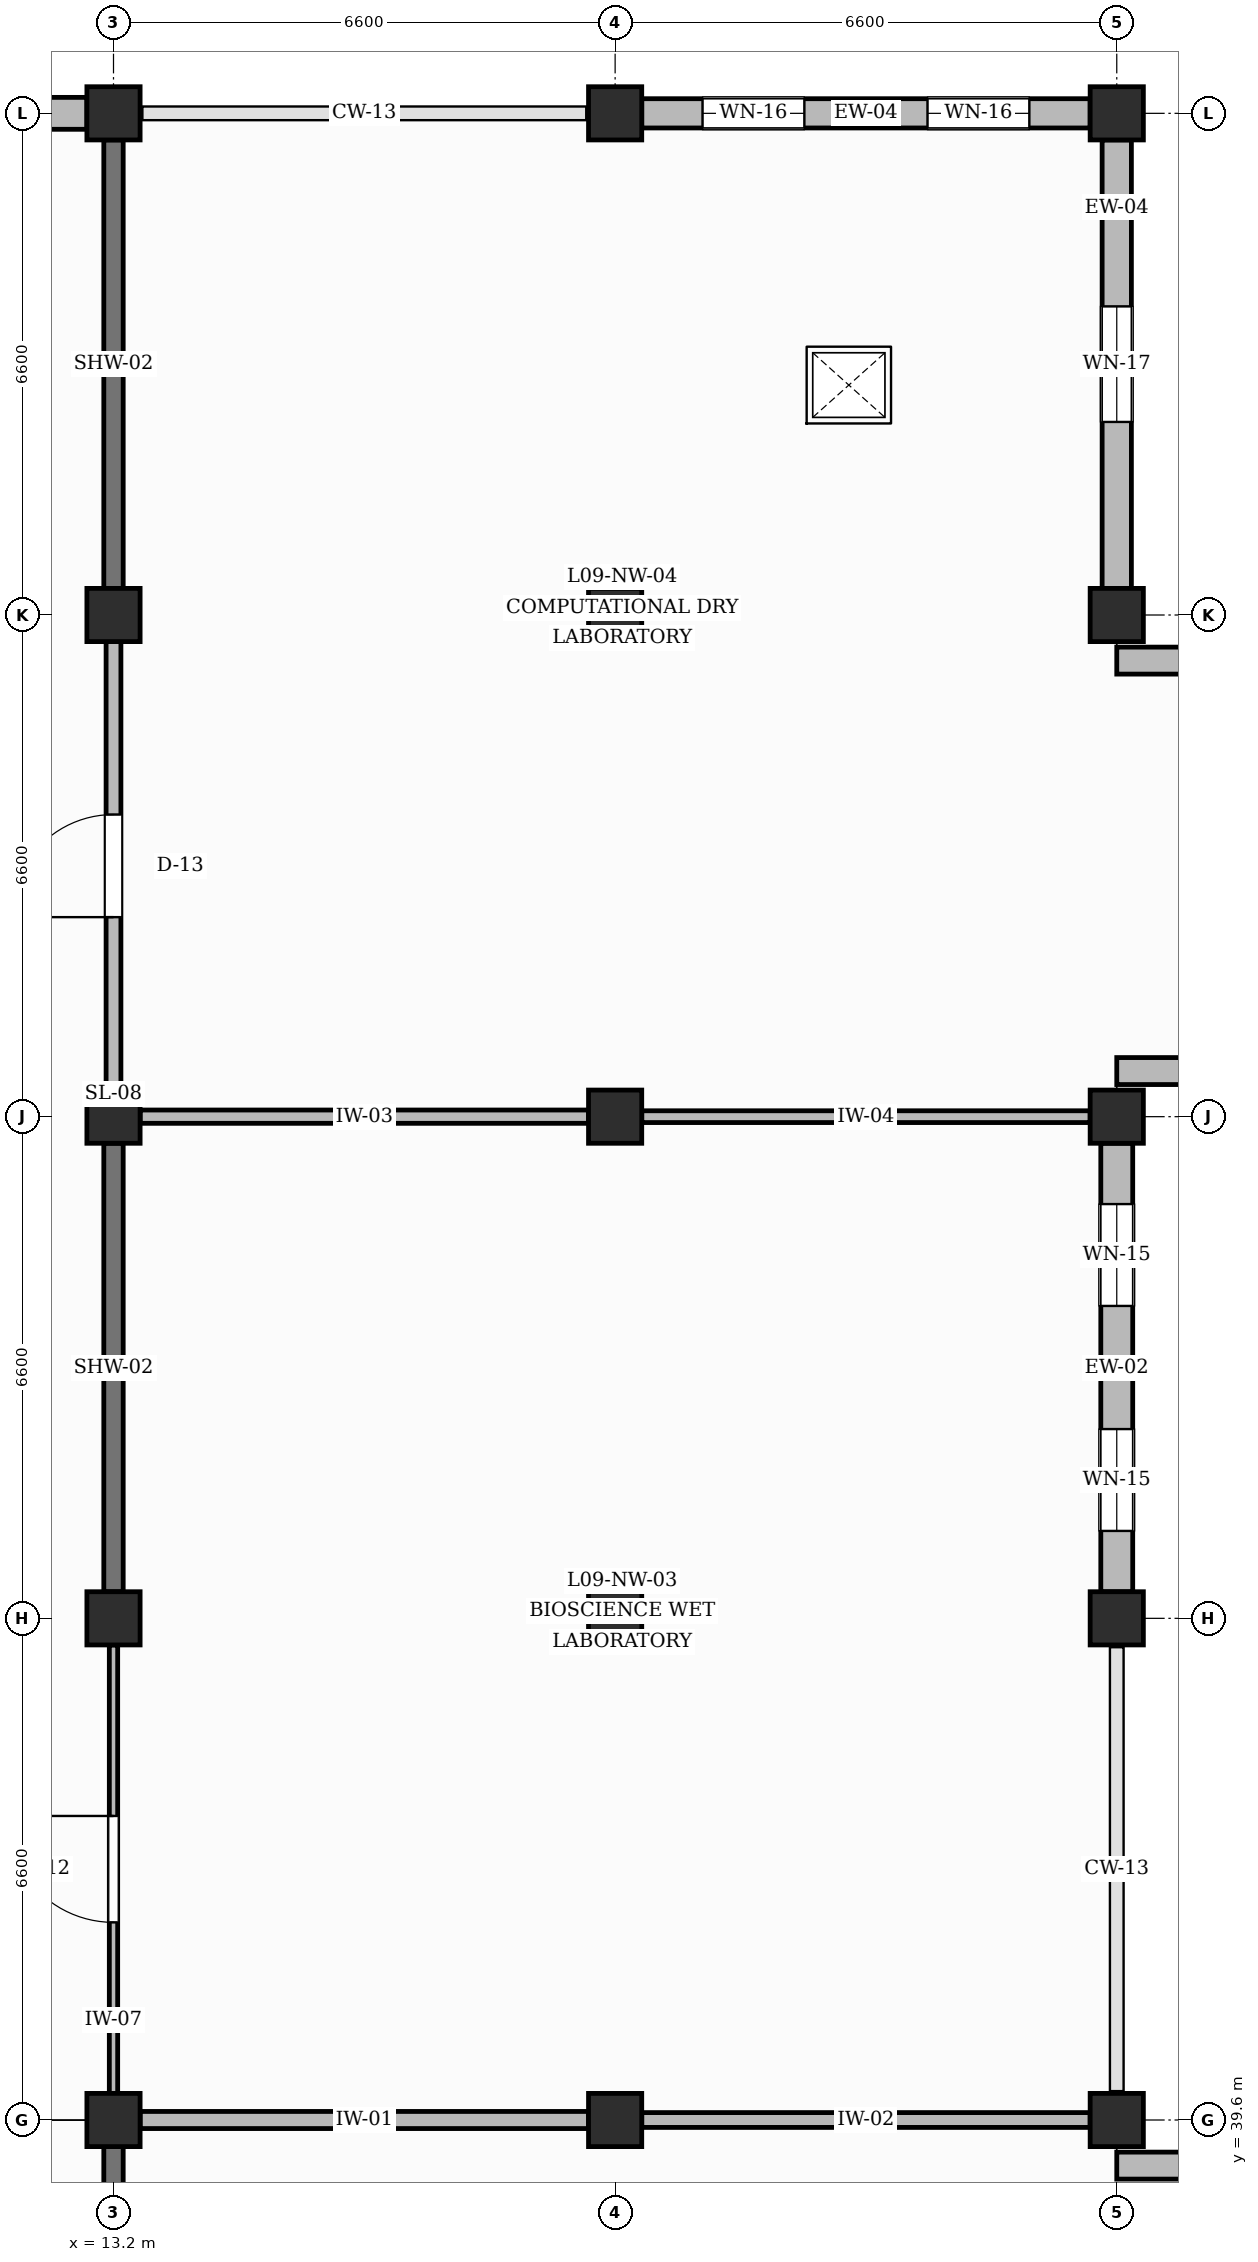
"""IFC4 building model, lengths in metres.
Left out: names, types, materials, properties, quantities, classifications, styles, units other than length and angle.
Written with IfcOpenShell. Run it as: python <this file> out.ifc"""

import sys

from ifc_helpers import new_model, si_unit, direction, frame, frame_2d, origin, origin_2d, place, context, subcontext, project, spatial, rectangle, extrude, element, fill, save


model = new_model("IFC4")
c1 = context("Model", 3, precision=1e-05, world=origin(), true_north=direction((0.0, 1.0)))
c2 = subcontext(c1, "Body", "Model", "MODEL_VIEW")
j1 = project(units=[si_unit("LENGTHUNIT", "METRE"), si_unit("PLANEANGLEUNIT", "RADIAN")], contexts=[c1])
p1 = place(None, origin())
s1 = spatial("IfcSite", under=j1, at=p1, CompositionType="ELEMENT")
p2 = place(p1, origin())
s2 = spatial("IfcBuilding", under=s1, at=p2, CompositionType="ELEMENT")
p3 = place(p2, frame((0.0, 0.0, 39.6)))
s3 = spatial("IfcBuildingStorey", under=s2, at=p3, CompositionType="ELEMENT", Elevation=39.6)
for number, where, z_axis, x_axis in (
    (1, (13.2, 39.6, 0.0), (0.0, 0.0, 1.0), (1.0, 0.0, 0.0)),
    (2, (13.2, 46.2, 0.0), (0.0, 0.0, 1.0), (1.0, 0.0, 0.0)),
    (3, (13.2, 52.8, 0.0), (0.0, 0.0, 1.0), (1.0, 0.0, 0.0)),
    (4, (13.2, 59.4, 0.0), (0.0, 0.0, 1.0), (1.0, 0.0, 0.0)),
    (5, (13.2, 66.0, 0.0), (0.0, 0.0, 1.0), (1.0, 0.0, 0.0)),
    (6, (19.8, 39.6, 0.0), (0.0, 0.0, 1.0), (1.0, 0.0, 0.0)),
    (7, (19.8, 46.2, 0.0), (0.0, 0.0, 1.0), (1.0, 0.0, 0.0)),
    (8, (19.8, 52.8, 0.0), (0.0, 0.0, 1.0), (1.0, 0.0, 0.0)),
    (9, (19.8, 59.4, 0.0), (0.0, 0.0, 1.0), (1.0, 0.0, 0.0)),
    (10, (19.8, 66.0, 0.0), (0.0, 0.0, 1.0), (1.0, 0.0, 0.0)),
    (11, (26.4, 39.6, 0.0), (0.0, 0.0, 1.0), (1.0, 0.0, 0.0)),
    (12, (26.4, 46.2, 0.0), (0.0, 0.0, 1.0), (1.0, 0.0, 0.0)),
    (13, (26.4, 52.8, 0.0), (0.0, 0.0, 1.0), (1.0, 0.0, 0.0)),
    (14, (26.4, 59.4, 0.0), (0.0, 0.0, 1.0), (1.0, 0.0, 0.0)),
    (15, (26.4, 66.0, 0.0), (0.0, 0.0, 1.0), (1.0, 0.0, 0.0)),
):
    element("IfcColumn", number, at=place(p3, frame(where, z_axis=z_axis, x_axis=x_axis)), inside=s3, PredefinedType="COLUMN", context=c2, shape_type="SweptSolid", body=[
        extrude(rectangle(XDim=0.7, YDim=0.7, at=origin_2d()), origin(), (0.0, 0.0, 1.0), 4.2),
    ])
p4 = place(p3, frame((6.95, 66.0, 0.0), z_axis=(0.0, 0.0, 1.0), x_axis=(1.0, 0.0, 0.0)))
e16 = element("IfcWall", 16, at=p4, inside=s3, PredefinedType="SOLIDWALL", context=c2, shape_type="SweptSolid", body=[
    extrude(rectangle(XDim=5.9, YDim=0.42, at=frame_2d((2.95, 0.0))), origin(), (0.0, 0.0, 1.0), 3.29),
])
p5 = place(p4, frame((0.8, 0.0, 0.95)))
e17 = element("IfcOpeningElement", 17, at=p5, cuts=e16, PredefinedType="OPENING", context=c2, shape_type="SweptSolid", body=[
    extrude(rectangle(XDim=1.34, YDim=1.52, at=frame_2d((0.67, 0.76))), frame((0.0, 0.22, 0.0), z_axis=(0.0, -1.0, 0.0), x_axis=(1.0, 0.0, 0.0)), (0.0, 0.0, 1.0), 0.44),
])
p6 = place(p4, frame((3.76, 0.0, 0.95)))
e18 = element("IfcOpeningElement", 18, at=p6, cuts=e16, PredefinedType="OPENING", context=c2, shape_type="SweptSolid", body=[
    extrude(rectangle(XDim=1.34, YDim=1.52, at=frame_2d((0.67, 0.76))), frame((0.0, 0.22, 0.0), z_axis=(0.0, -1.0, 0.0), x_axis=(1.0, 0.0, 0.0)), (0.0, 0.0, 1.0), 0.44),
])
p7 = place(p3, frame((26.4, 39.0, 0.0), z_axis=(0.0, 0.0, 1.0), x_axis=(1.0, 0.0, 0.0)))
e19 = element("IfcWall", 19, at=p7, inside=s3, PredefinedType="SOLIDWALL", context=c2, shape_type="SweptSolid", body=[
    extrude(rectangle(XDim=2.0, YDim=0.355, at=frame_2d((1.0, 0.0))), origin(), (0.0, 0.0, 1.0), 3.29),
])
p8 = place(p3, frame((26.4, 46.55, 0.0), z_axis=(0.0, 0.0, 1.0), x_axis=(0.0, 1.0, 0.0)))
e20 = element("IfcWall", 20, at=p8, inside=s3, PredefinedType="SOLIDWALL", context=c2, shape_type="SweptSolid", body=[
    extrude(rectangle(XDim=5.9, YDim=0.42, at=frame_2d((2.95, 0.0))), origin(), (0.0, 0.0, 1.0), 3.29),
])
p9 = place(p8, frame((0.8, 0.0, 0.95)))
e21 = element("IfcOpeningElement", 21, at=p9, cuts=e20, PredefinedType="OPENING", context=c2, shape_type="SweptSolid", body=[
    extrude(rectangle(XDim=1.34, YDim=1.74, at=frame_2d((0.67, 0.87))), frame((0.0, 0.22, 0.0), z_axis=(0.0, -1.0, 0.0), x_axis=(1.0, 0.0, 0.0)), (0.0, 0.0, 1.0), 0.44),
])
p10 = place(p8, frame((3.76, 0.0, 0.95)))
e22 = element("IfcOpeningElement", 22, at=p10, cuts=e20, PredefinedType="OPENING", context=c2, shape_type="SweptSolid", body=[
    extrude(rectangle(XDim=1.34, YDim=1.74, at=frame_2d((0.67, 0.87))), frame((0.0, 0.22, 0.0), z_axis=(0.0, -1.0, 0.0), x_axis=(1.0, 0.0, 0.0)), (0.0, 0.0, 1.0), 0.44),
])
for number, where, z_axis, x_axis in (
    (23, (26.4, 53.4, 0.0), (0.0, 0.0, 1.0), (1.0, 0.0, 0.0)),
    (24, (26.4, 58.8, 0.0), (0.0, 0.0, 1.0), (1.0, 0.0, 0.0)),
):
    element("IfcWall", number, at=place(p3, frame(where, z_axis=z_axis, x_axis=x_axis)), inside=s3, PredefinedType="SOLIDWALL", context=c2, shape_type="SweptSolid", body=[
        extrude(rectangle(XDim=2.0, YDim=0.355, at=frame_2d((1.0, 0.0))), origin(), (0.0, 0.0, 1.0), 3.29),
    ])
p11 = place(p3, frame((20.15, 66.0, 0.0), z_axis=(0.0, 0.0, 1.0), x_axis=(1.0, 0.0, 0.0)))
e25 = element("IfcWall", 25, at=p11, inside=s3, PredefinedType="SOLIDWALL", context=c2, shape_type="SweptSolid", body=[
    extrude(rectangle(XDim=5.9, YDim=0.385, at=frame_2d((2.95, 0.0))), origin(), (0.0, 0.0, 1.0), 3.29),
])
p12 = place(p11, frame((0.8, 0.0, 0.95)))
e26 = element("IfcOpeningElement", 26, at=p12, cuts=e25, PredefinedType="OPENING", context=c2, shape_type="SweptSolid", body=[
    extrude(rectangle(XDim=1.34, YDim=1.96, at=frame_2d((0.67, 0.98))), frame((0.0, 0.202, 0.0), z_axis=(0.0, -1.0, 0.0), x_axis=(1.0, 0.0, 0.0)), (0.0, 0.0, 1.0), 0.405),
])
p13 = place(p11, frame((3.76, 0.0, 0.95)))
e27 = element("IfcOpeningElement", 27, at=p13, cuts=e25, PredefinedType="OPENING", context=c2, shape_type="SweptSolid", body=[
    extrude(rectangle(XDim=1.34, YDim=1.96, at=frame_2d((0.67, 0.98))), frame((0.0, 0.202, 0.0), z_axis=(0.0, -1.0, 0.0), x_axis=(1.0, 0.0, 0.0)), (0.0, 0.0, 1.0), 0.405),
])
p14 = place(p3, frame((26.4, 59.75, 0.0), z_axis=(0.0, 0.0, 1.0), x_axis=(0.0, 1.0, 0.0)))
e28 = element("IfcWall", 28, at=p14, inside=s3, PredefinedType="SOLIDWALL", context=c2, shape_type="SweptSolid", body=[
    extrude(rectangle(XDim=5.9, YDim=0.385, at=frame_2d((2.95, 0.0))), origin(), (0.0, 0.0, 1.0), 3.29),
])
p15 = place(p14, frame((2.19, 0.0, 0.95)))
e29 = element("IfcOpeningElement", 29, at=p15, cuts=e28, PredefinedType="OPENING", context=c2, shape_type="SweptSolid", body=[
    extrude(rectangle(XDim=1.52, YDim=1.3, at=frame_2d((0.76, 0.65))), frame((0.0, 0.202, 0.0), z_axis=(0.0, -1.0, 0.0), x_axis=(1.0, 0.0, 0.0)), (0.0, 0.0, 1.0), 0.405),
])
p16 = place(p3, frame((13.2, 33.35, 0.0), z_axis=(0.0, 0.0, 1.0), x_axis=(0.0, 1.0, 0.0)))
e30 = element("IfcWall", 30, at=p16, inside=s3, PredefinedType="SHEAR", context=c2, shape_type="SweptSolid", body=[
    extrude(rectangle(XDim=5.9, YDim=0.255, at=frame_2d((2.95, 0.0))), origin(), (0.0, 0.0, 1.0), 3.29),
])
p17 = place(p3, frame((13.2, 39.95, 0.0), z_axis=(0.0, 0.0, 1.0), x_axis=(0.0, 1.0, 0.0)))
e31 = element("IfcWall", 31, at=p17, inside=s3, PredefinedType="PARTITIONING", context=c2, shape_type="SweptSolid", body=[
    extrude(rectangle(XDim=5.9, YDim=0.11, at=frame_2d((2.95, 0.0))), origin(), (0.0, 0.0, 1.0), 3.29),
])
p18 = place(p17, frame((2.25, 0.0, 0.0)))
e32 = element("IfcOpeningElement", 32, at=p18, cuts=e31, PredefinedType="OPENING", context=c2, shape_type="SweptSolid", body=[
    extrude(rectangle(XDim=1.4, YDim=2.25, at=frame_2d((0.7, 1.125))), frame((0.0, 0.065, 0.0), z_axis=(0.0, -1.0, 0.0), x_axis=(1.0, 0.0, 0.0)), (0.0, 0.0, 1.0), 0.13),
])
p19 = place(p3, frame((13.2, 46.55, 0.0), z_axis=(0.0, 0.0, 1.0), x_axis=(0.0, 1.0, 0.0)))
e33 = element("IfcWall", 33, at=p19, inside=s3, PredefinedType="SHEAR", context=c2, shape_type="SweptSolid", body=[
    extrude(rectangle(XDim=5.9, YDim=0.255, at=frame_2d((2.95, 0.0))), origin(), (0.0, 0.0, 1.0), 3.29),
])
p20 = place(p3, frame((13.2, 53.15, 0.0), z_axis=(0.0, 0.0, 1.0), x_axis=(0.0, 1.0, 0.0)))
e34 = element("IfcWall", 34, at=p20, inside=s3, PredefinedType="PARTITIONING", context=c2, shape_type="SweptSolid", body=[
    extrude(rectangle(XDim=5.9, YDim=0.195, at=frame_2d((2.95, 0.0))), origin(), (0.0, 0.0, 1.0), 3.29),
])
p21 = place(p20, frame((2.275, 0.0, 0.0)))
e35 = element("IfcOpeningElement", 35, at=p21, cuts=e34, PredefinedType="OPENING", context=c2, shape_type="SweptSolid", body=[
    extrude(rectangle(XDim=1.35, YDim=2.3, at=frame_2d((0.675, 1.15))), frame((0.0, 0.107, 0.0), z_axis=(0.0, -1.0, 0.0), x_axis=(1.0, 0.0, 0.0)), (0.0, 0.0, 1.0), 0.215),
])
p22 = place(p3, frame((13.2, 59.75, 0.0), z_axis=(0.0, 0.0, 1.0), x_axis=(0.0, 1.0, 0.0)))
e36 = element("IfcWall", 36, at=p22, inside=s3, PredefinedType="SHEAR", context=c2, shape_type="SweptSolid", body=[
    extrude(rectangle(XDim=5.9, YDim=0.255, at=frame_2d((2.95, 0.0))), origin(), (0.0, 0.0, 1.0), 3.29),
])
p23 = place(p3, frame((13.55, 39.6, 0.0), z_axis=(0.0, 0.0, 1.0), x_axis=(1.0, 0.0, 0.0)))
e37 = element("IfcWall", 37, at=p23, inside=s3, PredefinedType="PARTITIONING", context=c2, shape_type="SweptSolid", body=[
    extrude(rectangle(XDim=5.9, YDim=0.225, at=frame_2d((2.95, 0.0))), origin(), (0.0, 0.0, 1.0), 3.29),
])
p24 = place(p3, frame((13.55, 52.8, 0.0), z_axis=(0.0, 0.0, 1.0), x_axis=(1.0, 0.0, 0.0)))
e38 = element("IfcWall", 38, at=p24, inside=s3, PredefinedType="PARTITIONING", context=c2, shape_type="SweptSolid", body=[
    extrude(rectangle(XDim=5.9, YDim=0.175, at=frame_2d((2.95, 0.0))), origin(), (0.0, 0.0, 1.0), 3.29),
])
p25 = place(p3, frame((20.15, 39.6, 0.0), z_axis=(0.0, 0.0, 1.0), x_axis=(1.0, 0.0, 0.0)))
e39 = element("IfcWall", 39, at=p25, inside=s3, PredefinedType="PARTITIONING", context=c2, shape_type="SweptSolid", body=[
    extrude(rectangle(XDim=5.9, YDim=0.195, at=frame_2d((2.95, 0.0))), origin(), (0.0, 0.0, 1.0), 3.44),
])
p26 = place(p3, frame((20.15, 52.8, 0.0), z_axis=(0.0, 0.0, 1.0), x_axis=(1.0, 0.0, 0.0)))
e40 = element("IfcWall", 40, at=p26, inside=s3, PredefinedType="PARTITIONING", context=c2, shape_type="SweptSolid", body=[
    extrude(rectangle(XDim=5.9, YDim=0.155, at=frame_2d((2.95, 0.0))), origin(), (0.0, 0.0, 1.0), 3.44),
])
p27 = place(p9, origin())
e41 = element("IfcWindow", 41, at=p27, inside=s3, PartitioningType="SINGLE_PANEL", PredefinedType="WINDOW", context=c2, shape_type="SweptSolid", body=[
    extrude(rectangle(XDim=1.34, YDim=1.74, at=frame_2d((0.67, 0.87))), frame((0.0, 0.03, 0.0), z_axis=(0.0, -1.0, 0.0), x_axis=(1.0, 0.0, 0.0)), (0.0, 0.0, 1.0), 0.06),
])
fill(e21, e41)
p28 = place(p10, origin())
e42 = element("IfcWindow", 42, at=p28, inside=s3, PartitioningType="SINGLE_PANEL", PredefinedType="WINDOW", context=c2, shape_type="SweptSolid", body=[
    extrude(rectangle(XDim=1.34, YDim=1.74, at=frame_2d((0.67, 0.87))), frame((0.0, 0.03, 0.0), z_axis=(0.0, -1.0, 0.0), x_axis=(1.0, 0.0, 0.0)), (0.0, 0.0, 1.0), 0.06),
])
fill(e22, e42)
p29 = place(p12, origin())
e43 = element("IfcWindow", 43, at=p29, inside=s3, PartitioningType="SINGLE_PANEL", PredefinedType="WINDOW", context=c2, shape_type="SweptSolid", body=[
    extrude(rectangle(XDim=1.34, YDim=1.96, at=frame_2d((0.67, 0.98))), frame((0.0, 0.03, 0.0), z_axis=(0.0, -1.0, 0.0), x_axis=(1.0, 0.0, 0.0)), (0.0, 0.0, 1.0), 0.06),
])
fill(e26, e43)
p30 = place(p13, origin())
e44 = element("IfcWindow", 44, at=p30, inside=s3, PartitioningType="SINGLE_PANEL", PredefinedType="WINDOW", context=c2, shape_type="SweptSolid", body=[
    extrude(rectangle(XDim=1.34, YDim=1.96, at=frame_2d((0.67, 0.98))), frame((0.0, 0.03, 0.0), z_axis=(0.0, -1.0, 0.0), x_axis=(1.0, 0.0, 0.0)), (0.0, 0.0, 1.0), 0.06),
])
fill(e27, e44)
p31 = place(p15, origin())
e45 = element("IfcWindow", 45, at=p31, inside=s3, PartitioningType="DOUBLE_PANEL_VERTICAL", PredefinedType="WINDOW", context=c2, shape_type="SweptSolid", body=[
    extrude(rectangle(XDim=1.52, YDim=1.3, at=frame_2d((0.76, 0.65))), frame((0.0, 0.03, 0.0), z_axis=(0.0, -1.0, 0.0), x_axis=(1.0, 0.0, 0.0)), (0.0, 0.0, 1.0), 0.06),
])
fill(e29, e45)
p32 = place(p18, origin())
e46 = element("IfcDoor", 46, at=p32, inside=s3, OperationType="SINGLE_SWING_RIGHT", PredefinedType="DOOR", context=c2, shape_type="SweptSolid", body=[
    extrude(rectangle(XDim=1.4, YDim=2.25, at=frame_2d((0.7, 1.125))), frame((0.0, 0.025, 0.0), z_axis=(0.0, -1.0, 0.0), x_axis=(1.0, 0.0, 0.0)), (0.0, 0.0, 1.0), 0.05),
])
fill(e32, e46)
p33 = place(p21, origin())
e47 = element("IfcDoor", 47, at=p33, inside=s3, OperationType="SINGLE_SWING_LEFT", PredefinedType="DOOR", context=c2, shape_type="SweptSolid", body=[
    extrude(rectangle(XDim=1.35, YDim=2.3, at=frame_2d((0.675, 1.15))), frame((0.0, 0.025, 0.0), z_axis=(0.0, -1.0, 0.0), x_axis=(1.0, 0.0, 0.0)), (0.0, 0.0, 1.0), 0.05),
])
fill(e35, e47)
save(model, sys.argv[1])
